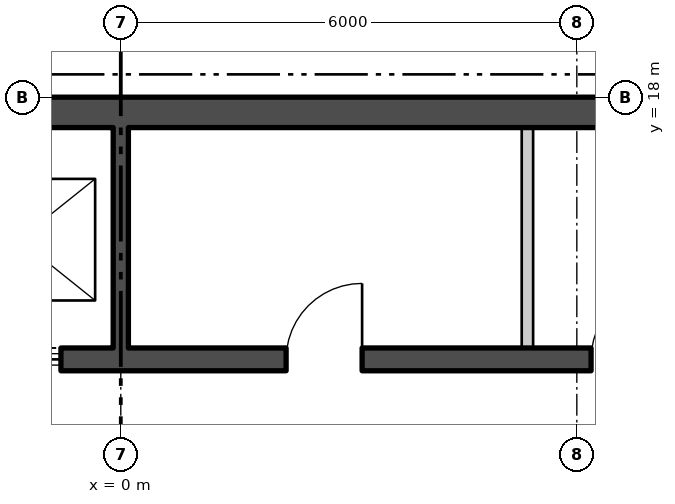
"""IFC4 building model, lengths in metres.
Left out: names, types, materials, properties, quantities, classifications, styles, units other than length and angle.
Written with IfcOpenShell. Run it as: python <this file> out.ifc"""

import sys

from ifc_helpers import new_model, si_unit, direction, frame, frame_2d, origin, place, context, subcontext, project, spatial, polyline, rectangle, outline, extrude, element, fill, save


model = new_model("IFC4")
c1 = context("Model", 3, precision=1e-05, world=origin(), true_north=direction((0.0, 1.0)))
c2 = subcontext(c1, "Body", "Model", "MODEL_VIEW")
j1 = project(units=[si_unit("LENGTHUNIT", "METRE"), si_unit("PLANEANGLEUNIT", "RADIAN")], contexts=[c1])
p1 = place(None, origin())
s1 = spatial("IfcSite", under=j1, at=p1, CompositionType="ELEMENT")
p2 = place(p1, origin())
s2 = spatial("IfcBuilding", under=s1, at=p2, CompositionType="ELEMENT")
p3 = place(p2, frame((0.0, 0.0, 245.4)))
s3 = spatial("IfcBuildingStorey", under=s2, at=p3, CompositionType="ELEMENT", Elevation=245.4)
p4 = place(p3, frame((2.975, -24.799, -0.18), z_axis=(0.0, 0.0, 1.0), x_axis=(0.500000335318, 0.866025210188, 0.0)))
e1 = element("IfcWall", 1, at=p4, inside=s3, PredefinedType="SOLIDWALL", context=c2, shape_type="SweptSolid", body=[
    extrude(outline(polyline([(-0.13, -0.225), (45.88, -0.225), (45.62, 0.225), (0.13, 0.225), (-0.13, -0.225)])), origin(), (0.0, 0.0, 1.0), 3.68),
])
p5 = place(p4, frame((1.425, 0.0, 1.08)))
e2 = element("IfcOpeningElement", 2, at=p5, cuts=e1, PredefinedType="OPENING", context=c2, shape_type="SweptSolid", body=[
    extrude(rectangle(XDim=2.4, YDim=2.0, at=frame_2d((1.2, 1.0))), frame((0.0, 0.235, 0.0), z_axis=(0.0, -1.0, 0.0), x_axis=(1.0, 0.0, 0.0)), (0.0, 0.0, 1.0), 0.47),
])
p6 = place(p4, frame((5.895, 0.0, 1.08)))
e3 = element("IfcOpeningElement", 3, at=p6, cuts=e1, PredefinedType="OPENING", context=c2, shape_type="SweptSolid", body=[
    extrude(rectangle(XDim=2.4, YDim=2.0, at=frame_2d((1.2, 1.0))), frame((0.0, 0.235, 0.0), z_axis=(0.0, -1.0, 0.0), x_axis=(1.0, 0.0, 0.0)), (0.0, 0.0, 1.0), 0.47),
])
p7 = place(p4, frame((10.403, 0.0, 1.08)))
e4 = element("IfcOpeningElement", 4, at=p7, cuts=e1, PredefinedType="OPENING", context=c2, shape_type="SweptSolid", body=[
    extrude(rectangle(XDim=2.4, YDim=2.0, at=frame_2d((1.2, 1.0))), frame((0.0, 0.235, 0.0), z_axis=(0.0, -1.0, 0.0), x_axis=(1.0, 0.0, 0.0)), (0.0, 0.0, 1.0), 0.47),
])
p8 = place(p4, frame((14.912, 0.0, 1.08)))
e5 = element("IfcOpeningElement", 5, at=p8, cuts=e1, PredefinedType="OPENING", context=c2, shape_type="SweptSolid", body=[
    extrude(rectangle(XDim=2.4, YDim=2.0, at=frame_2d((1.2, 1.0))), frame((0.0, 0.235, 0.0), z_axis=(0.0, -1.0, 0.0), x_axis=(1.0, 0.0, 0.0)), (0.0, 0.0, 1.0), 0.47),
])
p9 = place(p4, frame((19.421, 0.0, 1.08)))
e6 = element("IfcOpeningElement", 6, at=p9, cuts=e1, PredefinedType="OPENING", context=c2, shape_type="SweptSolid", body=[
    extrude(rectangle(XDim=2.4, YDim=2.0, at=frame_2d((1.2, 1.0))), frame((0.0, 0.235, 0.0), z_axis=(0.0, -1.0, 0.0), x_axis=(1.0, 0.0, 0.0)), (0.0, 0.0, 1.0), 0.47),
])
p10 = place(p4, frame((23.929, 0.0, 1.08)))
e7 = element("IfcOpeningElement", 7, at=p10, cuts=e1, PredefinedType="OPENING", context=c2, shape_type="SweptSolid", body=[
    extrude(rectangle(XDim=2.4, YDim=2.0, at=frame_2d((1.2, 1.0))), frame((0.0, 0.235, 0.0), z_axis=(0.0, -1.0, 0.0), x_axis=(1.0, 0.0, 0.0)), (0.0, 0.0, 1.0), 0.47),
])
p11 = place(p4, frame((28.438, 0.0, 1.08)))
e8 = element("IfcOpeningElement", 8, at=p11, cuts=e1, PredefinedType="OPENING", context=c2, shape_type="SweptSolid", body=[
    extrude(rectangle(XDim=2.4, YDim=2.0, at=frame_2d((1.2, 1.0))), frame((0.0, 0.235, 0.0), z_axis=(0.0, -1.0, 0.0), x_axis=(1.0, 0.0, 0.0)), (0.0, 0.0, 1.0), 0.47),
])
p12 = place(p4, frame((32.947, 0.0, 1.08)))
e9 = element("IfcOpeningElement", 9, at=p12, cuts=e1, PredefinedType="OPENING", context=c2, shape_type="SweptSolid", body=[
    extrude(rectangle(XDim=2.4, YDim=2.0, at=frame_2d((1.2, 1.0))), frame((0.0, 0.235, 0.0), z_axis=(0.0, -1.0, 0.0), x_axis=(1.0, 0.0, 0.0)), (0.0, 0.0, 1.0), 0.47),
])
p13 = place(p4, frame((37.455, 0.0, 1.08)))
e10 = element("IfcOpeningElement", 10, at=p13, cuts=e1, PredefinedType="OPENING", context=c2, shape_type="SweptSolid", body=[
    extrude(rectangle(XDim=2.4, YDim=2.0, at=frame_2d((1.2, 1.0))), frame((0.0, 0.235, 0.0), z_axis=(0.0, -1.0, 0.0), x_axis=(1.0, 0.0, 0.0)), (0.0, 0.0, 1.0), 0.47),
])
p14 = place(p4, frame((41.925, 0.0, 1.08)))
e11 = element("IfcOpeningElement", 11, at=p14, cuts=e1, PredefinedType="OPENING", context=c2, shape_type="SweptSolid", body=[
    extrude(rectangle(XDim=2.4, YDim=2.0, at=frame_2d((1.2, 1.0))), frame((0.0, 0.235, 0.0), z_axis=(0.0, -1.0, 0.0), x_axis=(1.0, 0.0, 0.0)), (0.0, 0.0, 1.0), 0.47),
])
p15 = place(p3, frame((-14.5, 17.8, 0.0), z_axis=(0.0, 0.0, 1.0), x_axis=(1.0, 0.0, 0.0)))
e12 = element("IfcWall", 12, at=p15, inside=s3, PredefinedType="SHEAR", context=c2, shape_type="SweptSolid", body=[
    extrude(rectangle(XDim=29.0, YDim=0.4, at=frame_2d((14.5, 0.0))), origin(), (0.0, 0.0, 1.0), 3.7),
])
p16 = place(p3, frame((-10.7, 14.55, 0.0), z_axis=(0.0, 0.0, 1.0), x_axis=(1.0, 0.0, 0.0)))
e13 = element("IfcWall", 13, at=p16, inside=s3, PredefinedType="SHEAR", context=c2, shape_type="SweptSolid", body=[
    extrude(rectangle(XDim=21.4, YDim=0.3, at=frame_2d((10.7, 0.0))), origin(), (0.0, 0.0, 1.0), 3.7),
])
p17 = place(p16, frame((0.738, 0.0, 0.0)))
e14 = element("IfcOpeningElement", 14, at=p17, cuts=e13, PredefinedType="OPENING", context=c2, shape_type="SweptSolid", body=[
    extrude(rectangle(XDim=1.1, YDim=2.1, at=frame_2d((0.55, 1.05))), frame((0.0, 0.16, 0.0), z_axis=(0.0, -1.0, 0.0), x_axis=(1.0, 0.0, 0.0)), (0.0, 0.0, 1.0), 0.32),
])
p18 = place(p16, frame((3.462, 0.0, 0.0)))
e15 = element("IfcOpeningElement", 15, at=p18, cuts=e13, PredefinedType="OPENING", context=c2, shape_type="SweptSolid", body=[
    extrude(rectangle(XDim=1.1, YDim=2.1, at=frame_2d((0.55, 1.05))), frame((0.0, 0.16, 0.0), z_axis=(0.0, -1.0, 0.0), x_axis=(1.0, 0.0, 0.0)), (0.0, 0.0, 1.0), 0.32),
])
p19 = place(p16, frame((6.138, 0.0, 0.0)))
e16 = element("IfcOpeningElement", 16, at=p19, cuts=e13, PredefinedType="OPENING", context=c2, shape_type="SweptSolid", body=[
    extrude(rectangle(XDim=1.1, YDim=2.1, at=frame_2d((0.55, 1.05))), frame((0.0, 0.16, 0.0), z_axis=(0.0, -1.0, 0.0), x_axis=(1.0, 0.0, 0.0)), (0.0, 0.0, 1.0), 0.32),
])
p20 = place(p16, frame((8.812, 0.0, 0.0)))
e17 = element("IfcOpeningElement", 17, at=p20, cuts=e13, PredefinedType="OPENING", context=c2, shape_type="SweptSolid", body=[
    extrude(rectangle(XDim=1.1, YDim=2.1, at=frame_2d((0.55, 1.05))), frame((0.0, 0.16, 0.0), z_axis=(0.0, -1.0, 0.0), x_axis=(1.0, 0.0, 0.0)), (0.0, 0.0, 1.0), 0.32),
])
p21 = place(p16, frame((19.562, 0.0, 0.0)))
e18 = element("IfcOpeningElement", 18, at=p21, cuts=e13, PredefinedType="OPENING", context=c2, shape_type="SweptSolid", body=[
    extrude(rectangle(XDim=1.1, YDim=2.1, at=frame_2d((0.55, 1.05))), frame((0.0, 0.16, 0.0), z_axis=(0.0, -1.0, 0.0), x_axis=(1.0, 0.0, 0.0)), (0.0, 0.0, 1.0), 0.32),
])
p22 = place(p16, frame((12.875, 0.0, 0.0)))
e19 = element("IfcOpeningElement", 19, at=p22, cuts=e13, PredefinedType="OPENING", context=c2, shape_type="SweptSolid", body=[
    extrude(rectangle(XDim=1.0, YDim=2.1, at=frame_2d((0.5, 1.05))), frame((0.0, 0.16, 0.0), z_axis=(0.0, -1.0, 0.0), x_axis=(1.0, 0.0, 0.0)), (0.0, 0.0, 1.0), 0.32),
])
p23 = place(p16, frame((16.887, 0.0, 0.0)))
e20 = element("IfcOpeningElement", 20, at=p23, cuts=e13, PredefinedType="OPENING", context=c2, shape_type="SweptSolid", body=[
    extrude(rectangle(XDim=1.0, YDim=2.1, at=frame_2d((0.5, 1.05))), frame((0.0, 0.16, 0.0), z_axis=(0.0, -1.0, 0.0), x_axis=(1.0, 0.0, 0.0)), (0.0, 0.0, 1.0), 0.32),
])
p24 = place(p3, frame((0.0, 14.7, 0.0), z_axis=(0.0, 0.0, 1.0), x_axis=(0.0, 1.0, 0.0)))
e21 = element("IfcWall", 21, at=p24, inside=s3, PredefinedType="SHEAR", context=c2, shape_type="SweptSolid", body=[
    extrude(rectangle(XDim=2.9, YDim=0.2, at=frame_2d((1.45, 0.0))), origin(), (0.0, 0.0, 1.0), 3.7),
])
p25 = place(p3, frame((5.35, 14.7, 0.0), z_axis=(0.0, 0.0, 1.0), x_axis=(0.0, 1.0, 0.0)))
e22 = element("IfcWall", 22, at=p25, inside=s3, PredefinedType="PARTITIONING", context=c2, shape_type="SweptSolid", body=[
    extrude(rectangle(XDim=2.9, YDim=0.15, at=frame_2d((1.45, 0.0))), origin(), (0.0, 0.0, 1.0), 3.7),
])
p26 = place(p20, origin())
e23 = element("IfcDoor", 23, at=p26, inside=s3, OperationType="SLIDING_TO_LEFT", PredefinedType="DOOR", context=c2, shape_type="SweptSolid", body=[
    extrude(rectangle(XDim=1.1, YDim=2.1, at=frame_2d((0.55, 1.05))), frame((0.0, 0.025, 0.0), z_axis=(0.0, -1.0, 0.0), x_axis=(1.0, 0.0, 0.0)), (0.0, 0.0, 1.0), 0.05),
])
fill(e17, e23)
p27 = place(p22, origin())
e24 = element("IfcDoor", 24, at=p27, inside=s3, OperationType="SINGLE_SWING_LEFT", PredefinedType="DOOR", context=c2, shape_type="SweptSolid", body=[
    extrude(rectangle(XDim=1.0, YDim=2.1, at=frame_2d((0.5, 1.05))), frame((0.0, 0.025, 0.0), z_axis=(0.0, -1.0, 0.0), x_axis=(1.0, 0.0, 0.0)), (0.0, 0.0, 1.0), 0.05),
])
fill(e19, e24)
p28 = place(p23, origin())
e25 = element("IfcDoor", 25, at=p28, inside=s3, OperationType="SINGLE_SWING_LEFT", PredefinedType="DOOR", context=c2, shape_type="SweptSolid", body=[
    extrude(rectangle(XDim=1.0, YDim=2.1, at=frame_2d((0.5, 1.05))), frame((0.0, 0.025, 0.0), z_axis=(0.0, -1.0, 0.0), x_axis=(1.0, 0.0, 0.0)), (0.0, 0.0, 1.0), 0.05),
])
fill(e20, e25)
save(model, sys.argv[1])
